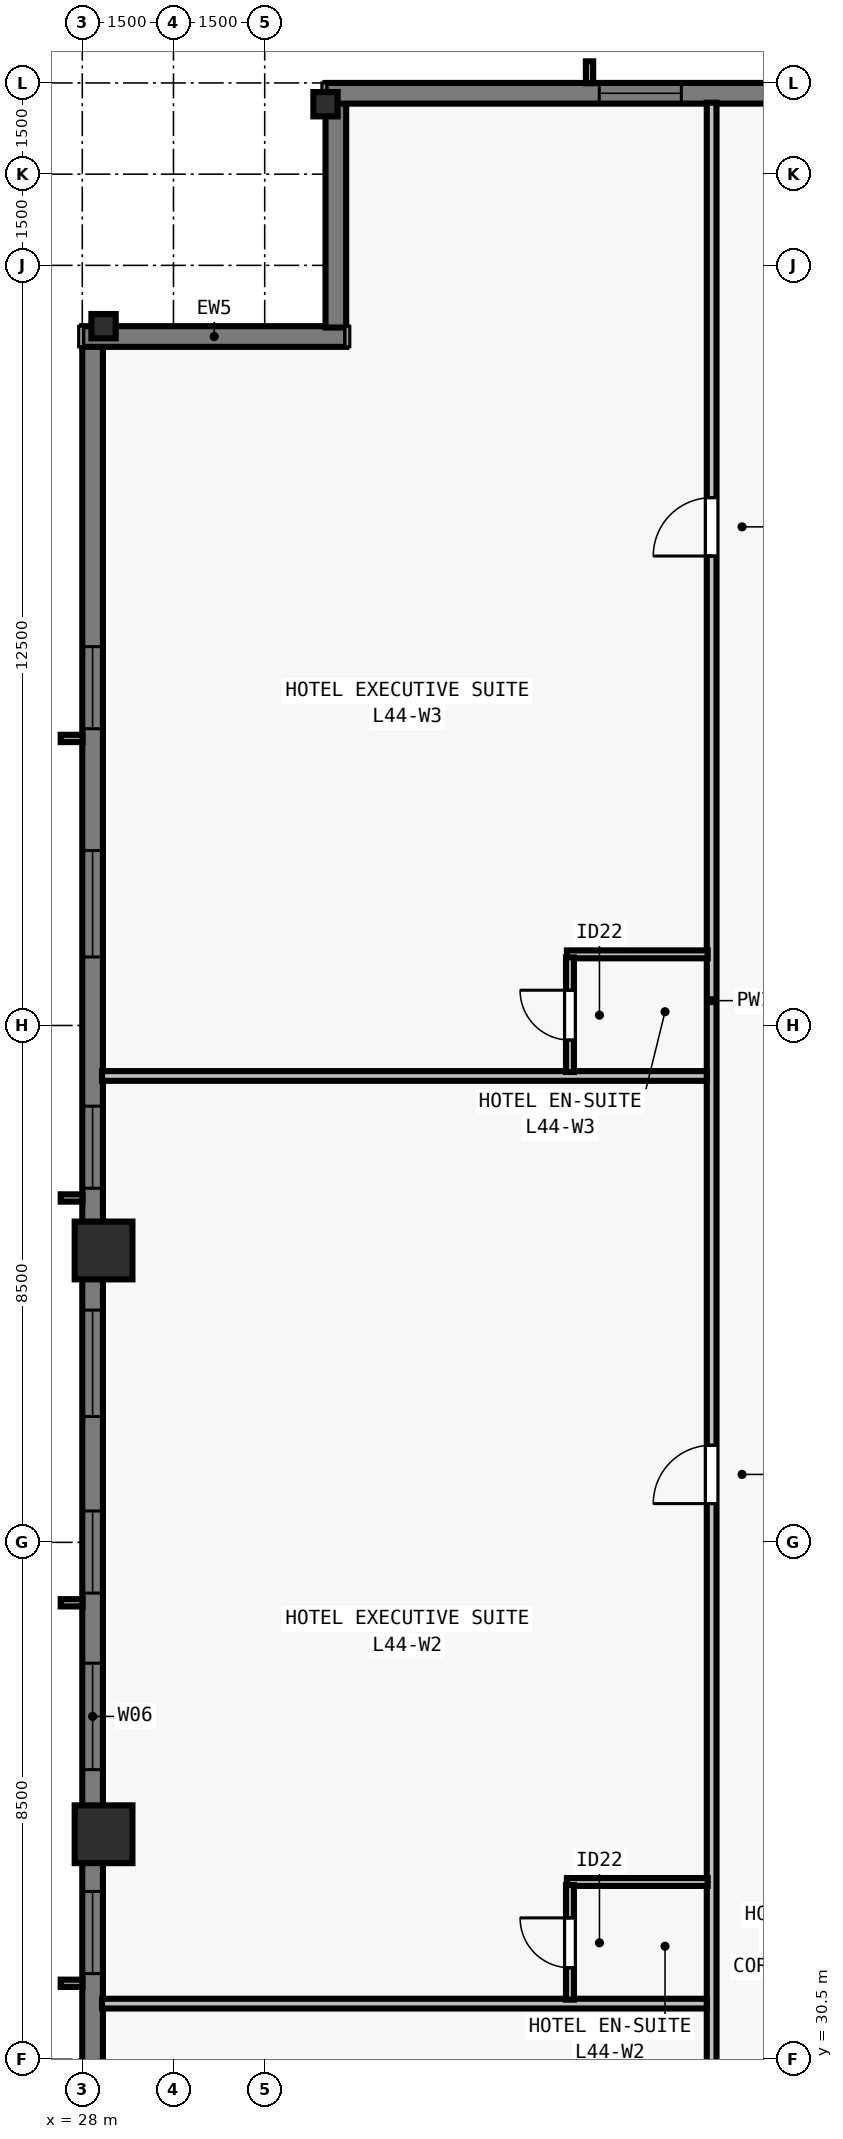
"""IFC4 building model, lengths in metres.
Left out: names, types, materials, properties, quantities, classifications, styles, units other than length and angle.
Written with IfcOpenShell. Run it as: python <this file> out.ifc"""

import sys

from ifc_helpers import new_model, si_unit, direction, frame, frame_2d, origin, origin_2d, place, context, subcontext, project, spatial, rectangle, i_section, extrude, element, fill, save


model = new_model("IFC4")
c1 = context("Model", 3, precision=1e-05, world=origin(), true_north=direction((0.0, 1.0)))
c2 = subcontext(c1, "Body", "Model", "MODEL_VIEW")
j1 = project(units=[si_unit("LENGTHUNIT", "METRE"), si_unit("PLANEANGLEUNIT", "RADIAN")], contexts=[c1])
p1 = place(None, origin())
s1 = spatial("IfcSite", under=j1, at=p1, CompositionType="ELEMENT")
p2 = place(p1, origin())
s2 = spatial("IfcBuilding", under=s1, at=p2, CompositionType="ELEMENT")
p3 = place(p2, frame((0.0, 0.0, 162.0)))
s3 = spatial("IfcBuildingStorey", under=s2, at=p3, CompositionType="ELEMENT", Elevation=162.0)
for number, where, z_axis, x_axis in (
    (1, (32.0, 62.65, 0.0), (0.0, 0.0, 1.0), (1.0, 0.0, 0.0)),
    (2, (28.35, 59.0, 0.0), (0.0, 0.0, 1.0), (0.0, 1.0, 0.0)),
):
    element("IfcColumn", number, at=place(p3, frame(where, z_axis=z_axis, x_axis=x_axis)), inside=s3, PredefinedType="COLUMN", context=c2, shape_type="SweptSolid", body=[
        extrude(i_section(OverallWidth=0.4, OverallDepth=0.4, WebThickness=0.022, FlangeThickness=0.036, at=origin_2d()), origin(), (0.0, 0.0, 1.0), 3.5),
    ])
for number, where, z_axis, x_axis in (
    (3, (28.35, 43.8, 0.0), (0.0, 0.0, 1.0), (0.0, 1.0, 0.0)),
    (4, (28.35, 34.2, 0.0), (0.0, 0.0, 1.0), (0.0, 1.0, 0.0)),
):
    element("IfcColumn", number, at=place(p3, frame(where, z_axis=z_axis, x_axis=x_axis)), inside=s3, PredefinedType="COLUMN", context=c2, shape_type="SweptSolid", body=[
        extrude(rectangle(XDim=0.95, YDim=0.95, at=origin_2d()), origin(), (0.0, 0.0, 1.0), 3.5),
    ])
p4 = place(p3, frame((28.17, 19.0, 0.0), z_axis=(0.0, 0.0, 1.0), x_axis=(0.0, 1.0, 0.0)))
e5 = element("IfcWall", 5, at=p4, inside=s3, PredefinedType="SOLIDWALL", context=c2, shape_type="SweptSolid", body=[
    extrude(rectangle(XDim=39.682, YDim=0.34, at=frame_2d((19.841, 0.0))), origin(), (0.0, 0.0, 1.0), 3.28),
])
p5 = place(p4, frame((4.952, 0.0, 0.8)))
e6 = element("IfcOpeningElement", 6, at=p5, cuts=e5, PredefinedType="OPENING", context=c2, shape_type="SweptSolid", body=[
    extrude(rectangle(XDim=1.35, YDim=1.66, at=frame_2d((0.675, 0.83))), frame((0.0, 0.18, 0.0), z_axis=(0.0, -1.0, 0.0), x_axis=(1.0, 0.0, 0.0)), (0.0, 0.0, 1.0), 0.36),
])
p6 = place(p4, frame((8.305, 0.0, 0.8)))
e7 = element("IfcOpeningElement", 7, at=p6, cuts=e5, PredefinedType="OPENING", context=c2, shape_type="SweptSolid", body=[
    extrude(rectangle(XDim=1.75, YDim=1.66, at=frame_2d((0.875, 0.83))), frame((0.0, 0.18, 0.0), z_axis=(0.0, -1.0, 0.0), x_axis=(1.0, 0.0, 0.0)), (0.0, 0.0, 1.0), 0.36),
])
p7 = place(p4, frame((12.909, 0.0, 0.8)))
e8 = element("IfcOpeningElement", 8, at=p7, cuts=e5, PredefinedType="OPENING", context=c2, shape_type="SweptSolid", body=[
    extrude(rectangle(XDim=1.35, YDim=1.66, at=frame_2d((0.675, 0.83))), frame((0.0, 0.18, 0.0), z_axis=(0.0, -1.0, 0.0), x_axis=(1.0, 0.0, 0.0)), (0.0, 0.0, 1.0), 0.36),
])
p8 = place(p4, frame((16.262, 0.0, 0.8)))
e9 = element("IfcOpeningElement", 9, at=p8, cuts=e5, PredefinedType="OPENING", context=c2, shape_type="SweptSolid", body=[
    extrude(rectangle(XDim=1.75, YDim=1.66, at=frame_2d((0.875, 0.83))), frame((0.0, 0.18, 0.0), z_axis=(0.0, -1.0, 0.0), x_axis=(1.0, 0.0, 0.0)), (0.0, 0.0, 1.0), 0.36),
])
p9 = place(p4, frame((19.166, 0.0, 0.8)))
e10 = element("IfcOpeningElement", 10, at=p9, cuts=e5, PredefinedType="OPENING", context=c2, shape_type="SweptSolid", body=[
    extrude(rectangle(XDim=1.35, YDim=1.66, at=frame_2d((0.675, 0.83))), frame((0.0, 0.18, 0.0), z_axis=(0.0, -1.0, 0.0), x_axis=(1.0, 0.0, 0.0)), (0.0, 0.0, 1.0), 0.36),
])
p10 = place(p4, frame((22.07, 0.0, 0.8)))
e11 = element("IfcOpeningElement", 11, at=p10, cuts=e5, PredefinedType="OPENING", context=c2, shape_type="SweptSolid", body=[
    extrude(rectangle(XDim=1.75, YDim=1.66, at=frame_2d((0.875, 0.83))), frame((0.0, 0.18, 0.0), z_axis=(0.0, -1.0, 0.0), x_axis=(1.0, 0.0, 0.0)), (0.0, 0.0, 1.0), 0.36),
])
p11 = place(p4, frame((25.823, 0.0, 0.8)))
e12 = element("IfcOpeningElement", 12, at=p11, cuts=e5, PredefinedType="OPENING", context=c2, shape_type="SweptSolid", body=[
    extrude(rectangle(XDim=1.35, YDim=1.66, at=frame_2d((0.675, 0.83))), frame((0.0, 0.18, 0.0), z_axis=(0.0, -1.0, 0.0), x_axis=(1.0, 0.0, 0.0)), (0.0, 0.0, 1.0), 0.36),
])
p12 = place(p4, frame((29.627, 0.0, 0.8)))
e13 = element("IfcOpeningElement", 13, at=p12, cuts=e5, PredefinedType="OPENING", context=c2, shape_type="SweptSolid", body=[
    extrude(rectangle(XDim=1.75, YDim=1.66, at=frame_2d((0.875, 0.83))), frame((0.0, 0.18, 0.0), z_axis=(0.0, -1.0, 0.0), x_axis=(1.0, 0.0, 0.0)), (0.0, 0.0, 1.0), 0.36),
])
p13 = place(p4, frame((33.38, 0.0, 0.8)))
e14 = element("IfcOpeningElement", 14, at=p13, cuts=e5, PredefinedType="OPENING", context=c2, shape_type="SweptSolid", body=[
    extrude(rectangle(XDim=1.35, YDim=1.66, at=frame_2d((0.675, 0.83))), frame((0.0, 0.18, 0.0), z_axis=(0.0, -1.0, 0.0), x_axis=(1.0, 0.0, 0.0)), (0.0, 0.0, 1.0), 0.36),
])
p14 = place(p3, frame((28.0, 58.83, 0.0), z_axis=(0.0, 0.0, 1.0), x_axis=(1.0, 0.0, 0.0)))
e15 = element("IfcWall", 15, at=p14, inside=s3, PredefinedType="SOLIDWALL", context=c2, shape_type="SweptSolid", body=[
    extrude(rectangle(XDim=4.34, YDim=0.34, at=frame_2d((2.17, 0.0))), origin(), (0.0, 0.0, 1.0), 3.28),
])
p15 = place(p3, frame((32.17, 58.978, 0.0), z_axis=(0.0, 0.0, 1.0), x_axis=(0.0, 1.0, 0.0)))
e16 = element("IfcWall", 16, at=p15, inside=s3, PredefinedType="SOLIDWALL", context=c2, shape_type="SweptSolid", body=[
    extrude(rectangle(XDim=3.704, YDim=0.34, at=frame_2d((1.852, 0.0))), origin(), (0.0, 0.0, 1.0), 3.28),
])
p16 = place(p3, frame((32.0, 62.83, 0.0), z_axis=(0.0, 0.0, 1.0), x_axis=(1.0, 0.0, 0.0)))
e17 = element("IfcWall", 17, at=p16, inside=s3, PredefinedType="SOLIDWALL", context=c2, shape_type="SweptSolid", body=[
    extrude(rectangle(XDim=39.682, YDim=0.34, at=frame_2d((19.841, 0.0))), origin(), (0.0, 0.0, 1.0), 3.28),
])
p17 = place(p16, frame((4.502, 0.0, 0.8)))
e18 = element("IfcOpeningElement", 18, at=p17, cuts=e17, PredefinedType="OPENING", context=c2, shape_type="SweptSolid", body=[
    extrude(rectangle(XDim=1.35, YDim=1.66, at=frame_2d((0.675, 0.83))), frame((0.0, 0.18, 0.0), z_axis=(0.0, -1.0, 0.0), x_axis=(1.0, 0.0, 0.0)), (0.0, 0.0, 1.0), 0.36),
])
p18 = place(p16, frame((8.755, 0.0, 0.8)))
e19 = element("IfcOpeningElement", 19, at=p18, cuts=e17, PredefinedType="OPENING", context=c2, shape_type="SweptSolid", body=[
    extrude(rectangle(XDim=1.75, YDim=1.66, at=frame_2d((0.875, 0.83))), frame((0.0, 0.18, 0.0), z_axis=(0.0, -1.0, 0.0), x_axis=(1.0, 0.0, 0.0)), (0.0, 0.0, 1.0), 0.36),
])
p19 = place(p16, frame((12.059, 0.0, 0.8)))
e20 = element("IfcOpeningElement", 20, at=p19, cuts=e17, PredefinedType="OPENING", context=c2, shape_type="SweptSolid", body=[
    extrude(rectangle(XDim=1.35, YDim=1.66, at=frame_2d((0.675, 0.83))), frame((0.0, 0.18, 0.0), z_axis=(0.0, -1.0, 0.0), x_axis=(1.0, 0.0, 0.0)), (0.0, 0.0, 1.0), 0.36),
])
p20 = place(p16, frame((16.262, 0.0, 0.8)))
e21 = element("IfcOpeningElement", 21, at=p20, cuts=e17, PredefinedType="OPENING", context=c2, shape_type="SweptSolid", body=[
    extrude(rectangle(XDim=1.75, YDim=1.66, at=frame_2d((0.875, 0.83))), frame((0.0, 0.18, 0.0), z_axis=(0.0, -1.0, 0.0), x_axis=(1.0, 0.0, 0.0)), (0.0, 0.0, 1.0), 0.36),
])
p21 = place(p16, frame((19.166, 0.0, 0.8)))
e22 = element("IfcOpeningElement", 22, at=p21, cuts=e17, PredefinedType="OPENING", context=c2, shape_type="SweptSolid", body=[
    extrude(rectangle(XDim=1.35, YDim=1.66, at=frame_2d((0.675, 0.83))), frame((0.0, 0.18, 0.0), z_axis=(0.0, -1.0, 0.0), x_axis=(1.0, 0.0, 0.0)), (0.0, 0.0, 1.0), 0.36),
])
p22 = place(p16, frame((22.07, 0.0, 0.8)))
e23 = element("IfcOpeningElement", 23, at=p22, cuts=e17, PredefinedType="OPENING", context=c2, shape_type="SweptSolid", body=[
    extrude(rectangle(XDim=1.75, YDim=1.66, at=frame_2d((0.875, 0.83))), frame((0.0, 0.18, 0.0), z_axis=(0.0, -1.0, 0.0), x_axis=(1.0, 0.0, 0.0)), (0.0, 0.0, 1.0), 0.36),
])
p23 = place(p16, frame((26.273, 0.0, 0.8)))
e24 = element("IfcOpeningElement", 24, at=p23, cuts=e17, PredefinedType="OPENING", context=c2, shape_type="SweptSolid", body=[
    extrude(rectangle(XDim=1.35, YDim=1.66, at=frame_2d((0.675, 0.83))), frame((0.0, 0.18, 0.0), z_axis=(0.0, -1.0, 0.0), x_axis=(1.0, 0.0, 0.0)), (0.0, 0.0, 1.0), 0.36),
])
p24 = place(p16, frame((28.377, 0.0, 0.8)))
e25 = element("IfcOpeningElement", 25, at=p24, cuts=e17, PredefinedType="OPENING", context=c2, shape_type="SweptSolid", body=[
    extrude(rectangle(XDim=1.75, YDim=1.66, at=frame_2d((0.875, 0.83))), frame((0.0, 0.18, 0.0), z_axis=(0.0, -1.0, 0.0), x_axis=(1.0, 0.0, 0.0)), (0.0, 0.0, 1.0), 0.36),
])
p25 = place(p16, frame((33.38, 0.0, 0.8)))
e26 = element("IfcOpeningElement", 26, at=p25, cuts=e17, PredefinedType="OPENING", context=c2, shape_type="SweptSolid", body=[
    extrude(rectangle(XDim=1.35, YDim=1.66, at=frame_2d((0.675, 0.83))), frame((0.0, 0.18, 0.0), z_axis=(0.0, -1.0, 0.0), x_axis=(1.0, 0.0, 0.0)), (0.0, 0.0, 1.0), 0.36),
])
p26 = place(p3, frame((38.35, 15.325, 0.0), z_axis=(0.0, 0.0, 1.0), x_axis=(0.0, 1.0, 0.0)))
e27 = element("IfcWall", 27, at=p26, inside=s3, PredefinedType="PARTITIONING", context=c2, shape_type="SweptSolid", body=[
    extrude(rectangle(XDim=47.35, YDim=0.16, at=frame_2d((23.675, 0.0))), origin(), (0.0, 0.0, 1.0), 2.555),
])
p27 = place(p26, frame((8.912, 0.0, 0.0)))
e28 = element("IfcOpeningElement", 28, at=p27, cuts=e27, PredefinedType="OPENING", context=c2, shape_type="SweptSolid", body=[
    extrude(rectangle(XDim=0.96, YDim=2.15, at=frame_2d((0.48, 1.075))), frame((0.0, 0.09, 0.0), z_axis=(0.0, -1.0, 0.0), x_axis=(1.0, 0.0, 0.0)), (0.0, 0.0, 1.0), 0.18),
])
p28 = place(p26, frame((24.312, 0.0, 0.0)))
e29 = element("IfcOpeningElement", 29, at=p28, cuts=e27, PredefinedType="OPENING", context=c2, shape_type="SweptSolid", body=[
    extrude(rectangle(XDim=0.96, YDim=2.15, at=frame_2d((0.48, 1.075))), frame((0.0, 0.09, 0.0), z_axis=(0.0, -1.0, 0.0), x_axis=(1.0, 0.0, 0.0)), (0.0, 0.0, 1.0), 0.18),
])
p29 = place(p26, frame((39.895, 0.0, 0.0)))
e30 = element("IfcOpeningElement", 30, at=p29, cuts=e27, PredefinedType="OPENING", context=c2, shape_type="SweptSolid", body=[
    extrude(rectangle(XDim=0.96, YDim=2.15, at=frame_2d((0.48, 1.075))), frame((0.0, 0.09, 0.0), z_axis=(0.0, -1.0, 0.0), x_axis=(1.0, 0.0, 0.0)), (0.0, 0.0, 1.0), 0.18),
])
p30 = place(p3, frame((28.325, 31.415, 0.0), z_axis=(0.0, 0.0, 1.0), x_axis=(1.0, 0.0, 0.0)))
e31 = element("IfcWall", 31, at=p30, inside=s3, PredefinedType="PARTITIONING", context=c2, shape_type="SweptSolid", body=[
    extrude(rectangle(XDim=9.945, YDim=0.16, at=frame_2d((4.973, 0.0))), origin(), (0.0, 0.0, 1.0), 3.28),
])
p31 = place(p3, frame((35.97, 33.415, 0.0), z_axis=(0.0, 0.0, 1.0), x_axis=(1.0, 0.0, 0.0)))
e32 = element("IfcWall", 32, at=p31, inside=s3, PredefinedType="PLUMBINGWALL", context=c2, shape_type="SweptSolid", body=[
    extrude(rectangle(XDim=2.315, YDim=0.13, at=frame_2d((1.157, 0.0))), origin(), (0.0, 0.0, 1.0), 3.28),
])
p32 = place(p3, frame((36.02, 31.479, 0.0), z_axis=(0.0, 0.0, 1.0), x_axis=(0.0, 1.0, 0.0)))
e33 = element("IfcWall", 33, at=p32, inside=s3, PredefinedType="PLUMBINGWALL", context=c2, shape_type="SweptSolid", body=[
    extrude(rectangle(XDim=1.885, YDim=0.13, at=frame_2d((0.942, 0.0))), origin(), (0.0, 0.0, 1.0), 3.28),
])
p33 = place(p32, frame((0.525, 0.0, 0.0)))
e34 = element("IfcOpeningElement", 34, at=p33, cuts=e33, PredefinedType="OPENING", context=c2, shape_type="SweptSolid", body=[
    extrude(rectangle(XDim=0.82, YDim=2.1, at=frame_2d((0.41, 1.05))), frame((0.0, 0.075, 0.0), z_axis=(0.0, -1.0, 0.0), x_axis=(1.0, 0.0, 0.0)), (0.0, 0.0, 1.0), 0.15),
])
p34 = place(p3, frame((28.325, 46.67, 0.0), z_axis=(0.0, 0.0, 1.0), x_axis=(1.0, 0.0, 0.0)))
e35 = element("IfcWall", 35, at=p34, inside=s3, PredefinedType="PARTITIONING", context=c2, shape_type="SweptSolid", body=[
    extrude(rectangle(XDim=9.945, YDim=0.16, at=frame_2d((4.973, 0.0))), origin(), (0.0, 0.0, 1.0), 3.28),
])
p35 = place(p3, frame((35.97, 48.67, 0.0), z_axis=(0.0, 0.0, 1.0), x_axis=(1.0, 0.0, 0.0)))
e36 = element("IfcWall", 36, at=p35, inside=s3, PredefinedType="PLUMBINGWALL", context=c2, shape_type="SweptSolid", body=[
    extrude(rectangle(XDim=2.315, YDim=0.13, at=frame_2d((1.157, 0.0))), origin(), (0.0, 0.0, 1.0), 3.28),
])
p36 = place(p3, frame((36.02, 46.735, 0.0), z_axis=(0.0, 0.0, 1.0), x_axis=(0.0, 1.0, 0.0)))
e37 = element("IfcWall", 37, at=p36, inside=s3, PredefinedType="PLUMBINGWALL", context=c2, shape_type="SweptSolid", body=[
    extrude(rectangle(XDim=1.885, YDim=0.13, at=frame_2d((0.942, 0.0))), origin(), (0.0, 0.0, 1.0), 3.28),
])
p37 = place(p36, frame((0.525, 0.0, 0.0)))
e38 = element("IfcOpeningElement", 38, at=p37, cuts=e37, PredefinedType="OPENING", context=c2, shape_type="SweptSolid", body=[
    extrude(rectangle(XDim=0.82, YDim=2.1, at=frame_2d((0.41, 1.05))), frame((0.0, 0.075, 0.0), z_axis=(0.0, -1.0, 0.0), x_axis=(1.0, 0.0, 0.0)), (0.0, 0.0, 1.0), 0.15),
])
p38 = place(p7, origin())
e39 = element("IfcWindow", 39, at=p38, inside=s3, PartitioningType="SINGLE_PANEL", PredefinedType="WINDOW", context=c2, shape_type="SweptSolid", body=[
    extrude(rectangle(XDim=1.35, YDim=1.66, at=frame_2d((0.675, 0.83))), frame((0.0, -0.05, 0.0), z_axis=(0.0, -1.0, 0.0), x_axis=(1.0, 0.0, 0.0)), (0.0, 0.0, 1.0), 0.06),
])
fill(e8, e39)
p39 = place(p8, origin())
e40 = element("IfcWindow", 40, at=p39, inside=s3, PartitioningType="SINGLE_PANEL", PredefinedType="WINDOW", context=c2, shape_type="SweptSolid", body=[
    extrude(rectangle(XDim=1.75, YDim=1.66, at=frame_2d((0.875, 0.83))), frame((0.0, -0.05, 0.0), z_axis=(0.0, -1.0, 0.0), x_axis=(1.0, 0.0, 0.0)), (0.0, 0.0, 1.0), 0.06),
])
fill(e9, e40)
p40 = place(p9, origin())
e41 = element("IfcWindow", 41, at=p40, inside=s3, PartitioningType="SINGLE_PANEL", PredefinedType="WINDOW", context=c2, shape_type="SweptSolid", body=[
    extrude(rectangle(XDim=1.35, YDim=1.66, at=frame_2d((0.675, 0.83))), frame((0.0, -0.05, 0.0), z_axis=(0.0, -1.0, 0.0), x_axis=(1.0, 0.0, 0.0)), (0.0, 0.0, 1.0), 0.06),
])
fill(e10, e41)
p41 = place(p10, origin())
e42 = element("IfcWindow", 42, at=p41, inside=s3, PartitioningType="SINGLE_PANEL", PredefinedType="WINDOW", context=c2, shape_type="SweptSolid", body=[
    extrude(rectangle(XDim=1.75, YDim=1.66, at=frame_2d((0.875, 0.83))), frame((0.0, -0.05, 0.0), z_axis=(0.0, -1.0, 0.0), x_axis=(1.0, 0.0, 0.0)), (0.0, 0.0, 1.0), 0.06),
])
fill(e11, e42)
p42 = place(p11, origin())
e43 = element("IfcWindow", 43, at=p42, inside=s3, PartitioningType="SINGLE_PANEL", PredefinedType="WINDOW", context=c2, shape_type="SweptSolid", body=[
    extrude(rectangle(XDim=1.35, YDim=1.66, at=frame_2d((0.675, 0.83))), frame((0.0, -0.05, 0.0), z_axis=(0.0, -1.0, 0.0), x_axis=(1.0, 0.0, 0.0)), (0.0, 0.0, 1.0), 0.06),
])
fill(e12, e43)
p43 = place(p12, origin())
e44 = element("IfcWindow", 44, at=p43, inside=s3, PartitioningType="SINGLE_PANEL", PredefinedType="WINDOW", context=c2, shape_type="SweptSolid", body=[
    extrude(rectangle(XDim=1.75, YDim=1.66, at=frame_2d((0.875, 0.83))), frame((0.0, -0.05, 0.0), z_axis=(0.0, -1.0, 0.0), x_axis=(1.0, 0.0, 0.0)), (0.0, 0.0, 1.0), 0.06),
])
fill(e13, e44)
p44 = place(p13, origin())
e45 = element("IfcWindow", 45, at=p44, inside=s3, PartitioningType="SINGLE_PANEL", PredefinedType="WINDOW", context=c2, shape_type="SweptSolid", body=[
    extrude(rectangle(XDim=1.35, YDim=1.66, at=frame_2d((0.675, 0.83))), frame((0.0, -0.05, 0.0), z_axis=(0.0, -1.0, 0.0), x_axis=(1.0, 0.0, 0.0)), (0.0, 0.0, 1.0), 0.06),
])
fill(e14, e45)
p45 = place(p17, origin())
e46 = element("IfcWindow", 46, at=p45, inside=s3, PartitioningType="SINGLE_PANEL", PredefinedType="WINDOW", context=c2, shape_type="SweptSolid", body=[
    extrude(rectangle(XDim=1.35, YDim=1.66, at=frame_2d((0.675, 0.83))), frame((0.0, -0.05, 0.0), z_axis=(0.0, -1.0, 0.0), x_axis=(1.0, 0.0, 0.0)), (0.0, 0.0, 1.0), 0.06),
])
fill(e18, e46)
p46 = place(p33, origin())
e47 = element("IfcDoor", 47, at=p46, inside=s3, OperationType="SINGLE_SWING_RIGHT", PredefinedType="DOOR", context=c2, shape_type="SweptSolid", body=[
    extrude(rectangle(XDim=0.82, YDim=2.1, at=frame_2d((0.41, 1.05))), frame((0.0, 0.025, 0.0), z_axis=(0.0, -1.0, 0.0), x_axis=(1.0, 0.0, 0.0)), (0.0, 0.0, 1.0), 0.05),
])
fill(e34, e47)
p47 = place(p28, origin())
e48 = element("IfcDoor", 48, at=p47, inside=s3, OperationType="SINGLE_SWING_LEFT", PredefinedType="DOOR", context=c2, shape_type="SweptSolid", body=[
    extrude(rectangle(XDim=0.96, YDim=2.15, at=frame_2d((0.48, 1.075))), frame((0.0, 0.025, 0.0), z_axis=(0.0, -1.0, 0.0), x_axis=(1.0, 0.0, 0.0)), (0.0, 0.0, 1.0), 0.05),
])
fill(e29, e48)
p48 = place(p37, origin())
e49 = element("IfcDoor", 49, at=p48, inside=s3, OperationType="SINGLE_SWING_RIGHT", PredefinedType="DOOR", context=c2, shape_type="SweptSolid", body=[
    extrude(rectangle(XDim=0.82, YDim=2.1, at=frame_2d((0.41, 1.05))), frame((0.0, 0.025, 0.0), z_axis=(0.0, -1.0, 0.0), x_axis=(1.0, 0.0, 0.0)), (0.0, 0.0, 1.0), 0.05),
])
fill(e38, e49)
p49 = place(p29, origin())
e50 = element("IfcDoor", 50, at=p49, inside=s3, OperationType="SINGLE_SWING_LEFT", PredefinedType="DOOR", context=c2, shape_type="SweptSolid", body=[
    extrude(rectangle(XDim=0.96, YDim=2.15, at=frame_2d((0.48, 1.075))), frame((0.0, 0.025, 0.0), z_axis=(0.0, -1.0, 0.0), x_axis=(1.0, 0.0, 0.0)), (0.0, 0.0, 1.0), 0.05),
])
fill(e30, e50)
save(model, sys.argv[1])
